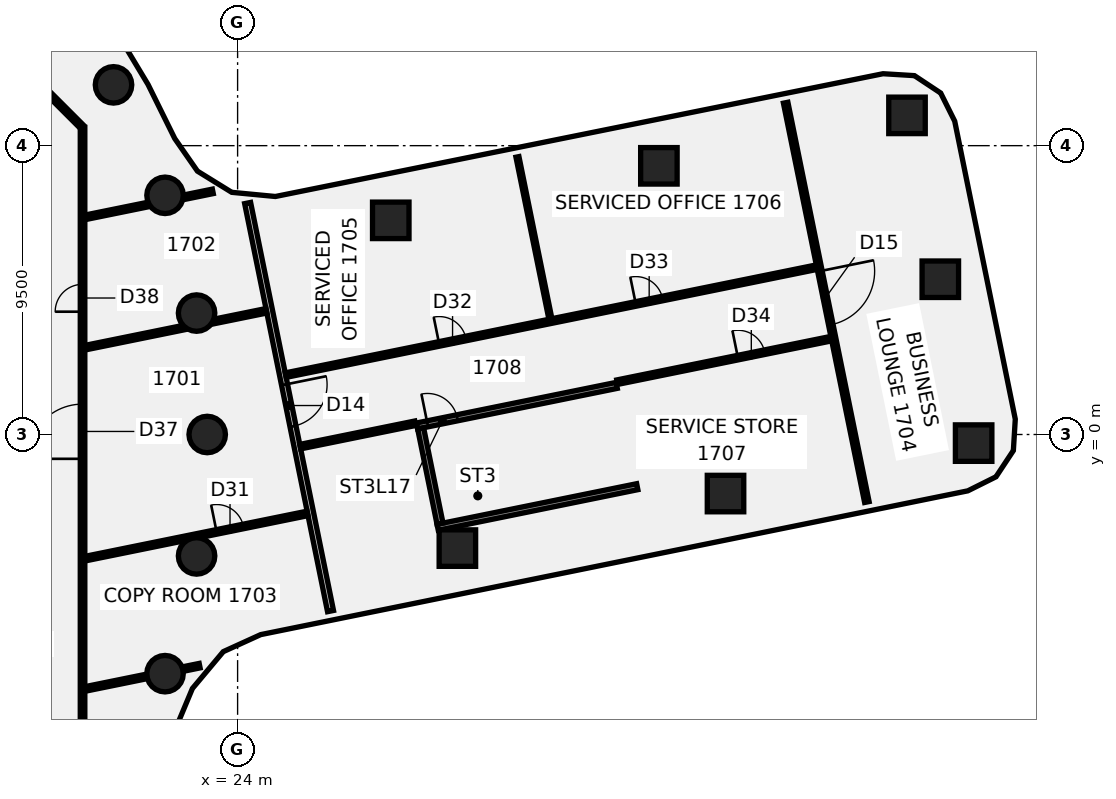
"""IFC4 building model, lengths in metres.
Left out: names, types, materials, properties, quantities, classifications, styles, units other than length and angle.
Written with IfcOpenShell. Run it as: python <this file> out.ifc"""

import sys

from ifc_helpers import new_model, si_unit, direction, frame, frame_2d, origin, origin_2d, place, context, subcontext, project, spatial, polyline, rectangle, circle, outline, extrude, element, fill, save


model = new_model("IFC4")
c1 = context("Model", 3, precision=1e-05, world=origin(), true_north=direction((0.0, 1.0)))
c2 = subcontext(c1, "Body", "Model", "MODEL_VIEW")
j1 = project(units=[si_unit("LENGTHUNIT", "METRE"), si_unit("PLANEANGLEUNIT", "RADIAN")], contexts=[c1])
p1 = place(None, origin())
s1 = spatial("IfcSite", under=j1, at=p1, CompositionType="ELEMENT")
p2 = place(p1, origin())
s2 = spatial("IfcBuilding", under=s1, at=p2, CompositionType="ELEMENT")
p3 = place(p2, frame((0.0, 0.0, 75.25)))
s3 = spatial("IfcBuildingStorey", under=s2, at=p3, CompositionType="ELEMENT", Elevation=75.25)
for number, where, z_axis, x_axis in (
    (1, (23.0, 0.0, -0.14), (0.0, 0.0, 1.0), (1.0, 0.0, 0.0)),
    (2, (22.651, 3.994, -0.14), (0.0, 0.0, 1.0), (1.0, 0.0, 0.0)),
    (3, (21.613, 7.866, -0.14), (0.0, 0.0, 1.0), (1.0, 0.0, 0.0)),
    (4, (19.919, 11.5, -0.14), (0.0, 0.0, 1.0), (1.0, 0.0, 0.0)),
    (5, (21.613, -7.866, -0.14), (0.0, 0.0, 1.0), (1.0, 0.0, 0.0)),
    (6, (22.651, -3.994, -0.14), (0.0, 0.0, 1.0), (1.0, 0.0, 0.0)),
):
    element("IfcColumn", number, at=place(p3, frame(where, z_axis=z_axis, x_axis=x_axis)), inside=s3, PredefinedType="COLUMN", context=c2, shape_type="SweptSolid", body=[
        extrude(circle(Radius=0.6, at=origin_2d()), origin(), (0.0, 0.0, 1.0), 3.71),
    ])
p4 = place(p3, frame((37.857, 8.837, -0.138), z_axis=(-0.043948835728, 0.07725535249, 0.996042223176), x_axis=(0.197093187203, -0.97674033462, 0.084454687756)))
e7 = element("IfcColumn", 7, at=p4, inside=s3, PredefinedType="COLUMN", context=c2, shape_type="SweptSolid", body=[
    extrude(rectangle(XDim=1.2, YDim=1.2, at=origin_2d()), origin(), (0.0, 0.0, 1.0), 3.716),
])
p5 = place(p3, frame((40.049, -1.943, -0.138), z_axis=(0.008673247864, 0.088440845648, 0.996043669521), x_axis=(-0.979765603585, -0.198432607845, 0.026150758614)))
e8 = element("IfcColumn", 8, at=p5, inside=s3, PredefinedType="COLUMN", context=c2, shape_type="SweptSolid", body=[
    extrude(rectangle(XDim=1.2, YDim=1.2, at=origin_2d()), origin(), (0.0, 0.0, 1.0), 3.716),
])
p6 = place(p3, frame((29.038, 7.043, -0.139), z_axis=(-0.034891014198, 0.034232693176, 0.998804655499), x_axis=(0.198537646121, -0.979256198152, 0.040498166061)))
e9 = element("IfcColumn", 9, at=p6, inside=s3, PredefinedType="COLUMN", context=c2, shape_type="SweptSolid", body=[
    extrude(rectangle(XDim=1.2, YDim=1.2, at=origin_2d()), origin(), (0.0, 0.0, 1.0), 3.708),
])
p7 = place(p3, frame((31.229, -3.736, -0.139), z_axis=(0.017907556487, 0.045427257265, 0.99880713039), x_axis=(-0.979708767156, -0.198653368973, 0.026600198356)))
e10 = element("IfcColumn", 10, at=p7, inside=s3, PredefinedType="COLUMN", context=c2, shape_type="SweptSolid", body=[
    extrude(rectangle(XDim=1.2, YDim=1.2, at=origin_2d()), origin(), (0.0, 0.0, 1.0), 3.708),
])
p8 = place(p3, frame((48.21, -0.283, -0.138), z_axis=(-0.002356773352, 0.127200295059, 0.991874251383), x_axis=(-0.979992577374, -0.197697779503, 0.023024688323)))
e11 = element("IfcColumn", 11, at=p8, inside=s3, PredefinedType="COLUMN", context=c2, shape_type="SweptSolid", body=[
    extrude(rectangle(XDim=1.2, YDim=1.2, at=origin_2d()), origin(), (0.0, 0.0, 1.0), 3.729),
])
p9 = place(p3, frame((47.114, 5.106, -0.138), z_axis=(-0.028607271039, 0.121695461927, 0.992155148447), x_axis=(0.197441138054, -0.972318457177, 0.124955251334)))
e12 = element("IfcColumn", 12, at=p9, inside=s3, PredefinedType="COLUMN", context=c2, shape_type="SweptSolid", body=[
    extrude(rectangle(XDim=1.2, YDim=1.2, at=origin_2d()), origin(), (0.0, 0.0, 1.0), 3.729),
])
p10 = place(p3, frame((46.018, 10.496, -0.138), z_axis=(-0.054848749218, 0.116046339335, 0.991728219744), x_axis=(0.1960216138, -0.972644227532, 0.124654456691)))
e13 = element("IfcColumn", 13, at=p10, inside=s3, PredefinedType="COLUMN", context=c2, shape_type="SweptSolid", body=[
    extrude(rectangle(XDim=1.2, YDim=1.2, at=origin_2d()), origin(), (0.0, 0.0, 1.0), 3.73),
])
p11 = place(p3, frame((24.33, 7.613, 0.0), z_axis=(0.0, 0.0, 1.0), x_axis=(0.199070356953, -0.97998520039, 0.0)))
e14 = element("IfcWall", 14, at=p11, inside=s3, PredefinedType="PARTITIONING", context=c2, shape_type="SweptSolid", body=[
    extrude(rectangle(XDim=13.695, YDim=0.2, at=frame_2d((6.848, 0.0))), origin(), (0.0, 0.0, 1.0), 2.87),
])
p12 = place(p11, frame((6.096, 0.0, 0.0)))
e15 = element("IfcOpeningElement", 15, at=p12, cuts=e14, PredefinedType="OPENING", context=c2, shape_type="SweptSolid", body=[
    extrude(rectangle(XDim=1.4, YDim=2.1, at=frame_2d((0.7, 1.05))), frame((0.0, 0.11, 0.0), z_axis=(0.0, -1.0, 0.0), x_axis=(1.0, 0.0, 0.0)), (0.0, 0.0, 1.0), 0.22),
])
p13 = place(p3, frame((33.205, 9.13, 0.0), z_axis=(0.0, 0.0, 1.0), x_axis=(0.199282852927, -0.979942010799, 0.0)))
e16 = element("IfcWall", 16, at=p13, inside=s3, PredefinedType="PARTITIONING", context=c2, shape_type="SweptSolid", body=[
    extrude(rectangle(XDim=5.439, YDim=0.1, at=frame_2d((2.72, 0.0))), origin(), (0.0, 0.0, 1.0), 2.97),
])
p14 = place(p3, frame((42.027, 10.912, 0.0), z_axis=(0.0, 0.0, 1.0), x_axis=(0.199292547886, -0.979940039164, 0.0)))
e17 = element("IfcWall", 17, at=p14, inside=s3, PredefinedType="PARTITIONING", context=c2, shape_type="SweptSolid", body=[
    extrude(rectangle(XDim=13.402, YDim=0.15, at=frame_2d((6.701, 0.0))), origin(), (0.0, 0.0, 1.0), 2.87),
])
p15 = place(p14, frame((5.654, 0.0, 0.0)))
e18 = element("IfcOpeningElement", 18, at=p15, cuts=e17, PredefinedType="OPENING", context=c2, shape_type="SweptSolid", body=[
    extrude(rectangle(XDim=1.8, YDim=2.1, at=frame_2d((0.9, 1.05))), frame((0.0, 0.085, 0.0), z_axis=(0.0, -1.0, 0.0), x_axis=(1.0, 0.0, 0.0)), (0.0, 0.0, 1.0), 0.17),
])
p16 = place(p3, frame((17.128, 11.872, 0.0), z_axis=(0.0, 0.0, 1.0), x_axis=(0.707106781187, -0.707106781187, 0.0)))
e19 = element("IfcWall", 19, at=p16, inside=s3, PredefinedType="PARTITIONING", context=c2, shape_type="SweptSolid", body=[
    extrude(rectangle(XDim=2.465, YDim=0.15, at=frame_2d((1.232, 0.0))), origin(), (0.0, 0.0, 1.0), 2.97),
])
p17 = place(p3, frame((18.973, -4.085, 0.0), z_axis=(0.0, 0.0, 1.0), x_axis=(0.979950067583, 0.19924323086, 0.0)))
e20 = element("IfcWall", 20, at=p17, inside=s3, PredefinedType="PARTITIONING", context=c2, shape_type="SweptSolid", body=[
    extrude(rectangle(XDim=7.475, YDim=0.15, at=frame_2d((3.737, 0.0))), origin(), (0.0, 0.0, 1.0), 2.87),
])
p18 = place(p17, frame((4.425, 0.0, 0.0)))
e21 = element("IfcOpeningElement", 21, at=p18, cuts=e20, PredefinedType="OPENING", context=c2, shape_type="SweptSolid", body=[
    extrude(rectangle(XDim=0.9, YDim=2.1, at=frame_2d((0.45, 1.05))), frame((0.0, 0.085, 0.0), z_axis=(0.0, -1.0, 0.0), x_axis=(1.0, 0.0, 0.0)), (0.0, 0.0, 1.0), 0.17),
])
p19 = place(p3, frame((18.973, 2.854, 0.0), z_axis=(0.0, 0.0, 1.0), x_axis=(0.979950296152, 0.199242106673, 0.0)))
e22 = element("IfcWall", 22, at=p19, inside=s3, PredefinedType="PARTITIONING", context=c2, shape_type="SweptSolid", body=[
    extrude(rectangle(XDim=3.378, YDim=0.15, at=frame_2d((1.689, 0.0))), origin(), (0.0, 0.0, 1.0), 2.97),
])
p20 = place(p3, frame((23.185, 3.71, 0.0), z_axis=(0.0, 0.0, 1.0), x_axis=(0.979938907772, 0.199298110967, 0.0)))
e23 = element("IfcWall", 23, at=p20, inside=s3, PredefinedType="PARTITIONING", context=c2, shape_type="SweptSolid", body=[
    extrude(rectangle(XDim=1.8, YDim=0.15, at=frame_2d((0.9, 0.0))), origin(), (0.0, 0.0, 1.0), 2.87),
])
p21 = place(p3, frame((18.973, -8.371, 0.0), z_axis=(0.0, 0.0, 1.0), x_axis=(0.979966356474, 0.199163099443, 0.0)))
e24 = element("IfcWall", 24, at=p21, inside=s3, PredefinedType="PARTITIONING", context=c2, shape_type="SweptSolid", body=[
    extrude(rectangle(XDim=2.095, YDim=0.15, at=frame_2d((1.047, 0.0))), origin(), (0.0, 0.0, 1.0), 2.97),
])
p22 = place(p3, frame((22.183, -7.719, 0.0), z_axis=(0.0, 0.0, 1.0), x_axis=(0.980025828953, 0.1988702456, 0.0)))
e25 = element("IfcWall", 25, at=p22, inside=s3, PredefinedType="PARTITIONING", context=c2, shape_type="SweptSolid", body=[
    extrude(rectangle(XDim=0.579, YDim=0.15, at=frame_2d((0.29, 0.0))), origin(), (0.0, 0.0, 1.0), 2.97),
])
p23 = place(p3, frame((25.583, 1.953, 0.0), z_axis=(0.0, 0.0, 1.0), x_axis=(0.979952528363, 0.199231127477, 0.0)))
e26 = element("IfcWall", 26, at=p23, inside=s3, PredefinedType="PARTITIONING", context=c2, shape_type="SweptSolid", body=[
    extrude(rectangle(XDim=17.825, YDim=0.15, at=frame_2d((8.913, 0.0))), origin(), (0.0, 0.0, 1.0), 2.87),
])
p24 = place(p23, frame((5.15, 0.0, 0.0)))
e27 = element("IfcOpeningElement", 27, at=p24, cuts=e26, PredefinedType="OPENING", context=c2, shape_type="SweptSolid", body=[
    extrude(rectangle(XDim=0.9, YDim=2.1, at=frame_2d((0.45, 1.05))), frame((0.0, 0.085, 0.0), z_axis=(0.0, -1.0, 0.0), x_axis=(1.0, 0.0, 0.0)), (0.0, 0.0, 1.0), 0.17),
])
p25 = place(p23, frame((11.75, 0.0, 0.0)))
e28 = element("IfcOpeningElement", 28, at=p25, cuts=e26, PredefinedType="OPENING", context=c2, shape_type="SweptSolid", body=[
    extrude(rectangle(XDim=0.9, YDim=2.1, at=frame_2d((0.45, 1.05))), frame((0.0, 0.085, 0.0), z_axis=(0.0, -1.0, 0.0), x_axis=(1.0, 0.0, 0.0)), (0.0, 0.0, 1.0), 0.17),
])
p26 = place(p3, frame((26.061, -0.399, 0.0), z_axis=(0.0, 0.0, 1.0), x_axis=(0.979938127912, 0.199301945462, 0.0)))
e29 = element("IfcWall", 29, at=p26, inside=s3, PredefinedType="PARTITIONING", context=c2, shape_type="SweptSolid", body=[
    extrude(rectangle(XDim=3.86, YDim=0.15, at=frame_2d((1.93, 0.0))), origin(), (0.0, 0.0, 1.0), 2.87),
])
p27 = place(p3, frame((36.487, 1.721, 0.0), z_axis=(0.0, 0.0, 1.0), x_axis=(0.979936437321, 0.199310257665, 0.0)))
e30 = element("IfcWall", 30, at=p27, inside=s3, PredefinedType="PARTITIONING", context=c2, shape_type="SweptSolid", body=[
    extrude(rectangle(XDim=7.186, YDim=0.15, at=frame_2d((3.593, 0.0))), origin(), (0.0, 0.0, 1.0), 2.87),
])
p28 = place(p27, frame((4.05, 0.0, 0.0)))
e31 = element("IfcOpeningElement", 31, at=p28, cuts=e30, PredefinedType="OPENING", context=c2, shape_type="SweptSolid", body=[
    extrude(rectangle(XDim=0.9, YDim=2.1, at=frame_2d((0.45, 1.05))), frame((0.0, 0.085, 0.0), z_axis=(0.0, -1.0, 0.0), x_axis=(1.0, 0.0, 0.0)), (0.0, 0.0, 1.0), 0.17),
])
p29 = place(p3, frame((18.973, 7.14, 0.0), z_axis=(0.0, 0.0, 1.0), x_axis=(0.979916380724, 0.199408843305, 0.0)))
e32 = element("IfcWall", 32, at=p29, inside=s3, PredefinedType="PARTITIONING", context=c2, shape_type="SweptSolid", body=[
    extrude(rectangle(XDim=2.152, YDim=0.15, at=frame_2d((1.076, 0.0))), origin(), (0.0, 0.0, 1.0), 2.97),
])
p30 = place(p3, frame((22.204, 7.797, 0.0), z_axis=(0.0, 0.0, 1.0), x_axis=(0.979965738982, 0.199166137736, 0.0)))
e33 = element("IfcWall", 33, at=p30, inside=s3, PredefinedType="PARTITIONING", context=c2, shape_type="SweptSolid", body=[
    extrude(rectangle(XDim=1.0, YDim=0.15, at=frame_2d((0.5, 0.0))), origin(), (0.0, 0.0, 1.0), 2.97),
])
p31 = place(p3, frame((18.9, -10.1, 0.0), z_axis=(0.0, 0.0, 1.0), x_axis=(0.0, 1.0, 0.0)))
e34 = element("IfcWall", 34, at=p31, inside=s3, PredefinedType="PARTITIONING", context=c2, shape_type="SweptSolid", body=[
    extrude(rectangle(XDim=20.2, YDim=0.15, at=frame_2d((10.1, 0.0))), origin(), (0.0, 0.0, 1.0), 2.97),
])
p32 = place(p31, frame((9.3, 0.0, 0.0)))
e35 = element("IfcOpeningElement", 35, at=p32, cuts=e34, PredefinedType="OPENING", context=c2, shape_type="SweptSolid", body=[
    extrude(rectangle(XDim=1.8, YDim=2.1, at=frame_2d((0.9, 1.05))), frame((0.0, 0.085, 0.0), z_axis=(0.0, -1.0, 0.0), x_axis=(1.0, 0.0, 0.0)), (0.0, 0.0, 1.0), 0.17),
])
p33 = place(p31, frame((14.139, 0.0, 0.0)))
e36 = element("IfcOpeningElement", 36, at=p33, cuts=e34, PredefinedType="OPENING", context=c2, shape_type="SweptSolid", body=[
    extrude(rectangle(XDim=0.9, YDim=2.1, at=frame_2d((0.45, 1.05))), frame((0.0, 0.085, 0.0), z_axis=(0.0, -1.0, 0.0), x_axis=(1.0, 0.0, 0.0)), (0.0, 0.0, 1.0), 0.17),
])
p34 = place(p3, frame((29.903, 0.28, -0.14), z_axis=(0.0, 0.0, 1.0), x_axis=(0.979956319534, 0.199212479042, 0.0)))
e37 = element("IfcWall", 37, at=p34, inside=s3, PredefinedType="SHEAR", context=c2, shape_type="SweptSolid", body=[
    extrude(rectangle(XDim=6.7, YDim=0.2, at=frame_2d((3.35, 0.0))), origin(), (0.0, 0.0, 1.0), 3.01),
])
p35 = place(p34, frame((0.35, 0.0, 0.0)))
e38 = element("IfcOpeningElement", 38, at=p35, cuts=e37, PredefinedType="OPENING", context=c2, shape_type="SweptSolid", body=[
    extrude(rectangle(XDim=1.0, YDim=2.1, at=frame_2d((0.5, 1.05))), frame((0.0, 0.11, 0.0), z_axis=(0.0, -1.0, 0.0), x_axis=(1.0, 0.0, 0.0)), (0.0, 0.0, 1.0), 0.22),
])
p36 = place(p3, frame((30.58, -3.052, -0.14), z_axis=(0.0, 0.0, 1.0), x_axis=(0.979949205339, 0.199247471639, 0.0)))
e39 = element("IfcWall", 39, at=p36, inside=s3, PredefinedType="SHEAR", context=c2, shape_type="SweptSolid", body=[
    extrude(rectangle(XDim=6.7, YDim=0.2, at=frame_2d((3.35, 0.0))), origin(), (0.0, 0.0, 1.0), 3.01),
])
p37 = place(p3, frame((30.658, -2.934, -0.14), z_axis=(0.0, 0.0, 1.0), x_axis=(-0.199284316026, 0.97994171326, 0.0)))
e40 = element("IfcWall", 40, at=p37, inside=s3, PredefinedType="SHEAR", context=c2, shape_type="SweptSolid", body=[
    extrude(rectangle(XDim=3.2, YDim=0.2, at=frame_2d((1.6, 0.0))), origin(), (0.0, 0.0, 1.0), 3.01),
])
p38 = place(p3, frame((0.0, 0.0, -0.14)))
e41 = element("IfcWall", 41, at=p38, inside=s3, PredefinedType="SHEAR", context=c2, shape_type="SweptSolid", body=[
    extrude(outline(polyline([(36.93, -1.659), (37.126, -1.619), (36.488, 1.517), (36.292, 1.477), (36.93, -1.659)])), origin(), (0.0, 0.0, 1.0), 3.01),
])
p39 = place(p12, frame((1.4, 0.0, 0.0), z_axis=(0.0, 0.0, 1.0), x_axis=(-1.0, 0.0, 0.0)))
e42 = element("IfcDoor", 42, at=p39, inside=s3, OperationType="DOUBLE_DOOR_SINGLE_SWING", PredefinedType="DOOR", context=c2, shape_type="SweptSolid", body=[
    extrude(rectangle(XDim=1.4, YDim=2.1, at=frame_2d((0.7, 1.05))), frame((0.0, 0.025, 0.0), z_axis=(0.0, -1.0, 0.0), x_axis=(1.0, 0.0, 0.0)), (0.0, 0.0, 1.0), 0.05),
])
fill(e15, e42)
p40 = place(p15, origin())
e43 = element("IfcDoor", 43, at=p40, inside=s3, OperationType="DOUBLE_DOOR_SINGLE_SWING", PredefinedType="DOOR", context=c2, shape_type="SweptSolid", body=[
    extrude(rectangle(XDim=1.8, YDim=2.1, at=frame_2d((0.9, 1.05))), frame((0.0, 0.025, 0.0), z_axis=(0.0, -1.0, 0.0), x_axis=(1.0, 0.0, 0.0)), (0.0, 0.0, 1.0), 0.05),
])
fill(e18, e43)
p41 = place(p18, frame((0.9, 0.0, 0.0), z_axis=(0.0, 0.0, 1.0), x_axis=(-1.0, 0.0, 0.0)))
e44 = element("IfcDoor", 44, at=p41, inside=s3, OperationType="SINGLE_SWING_RIGHT", PredefinedType="DOOR", context=c2, shape_type="SweptSolid", body=[
    extrude(rectangle(XDim=0.9, YDim=2.1, at=frame_2d((0.45, 1.05))), frame((0.0, 0.025, 0.0), z_axis=(0.0, -1.0, 0.0), x_axis=(1.0, 0.0, 0.0)), (0.0, 0.0, 1.0), 0.05),
])
fill(e21, e44)
p42 = place(p24, origin())
e45 = element("IfcDoor", 45, at=p42, inside=s3, OperationType="SINGLE_SWING_RIGHT", PredefinedType="DOOR", context=c2, shape_type="SweptSolid", body=[
    extrude(rectangle(XDim=0.9, YDim=2.1, at=frame_2d((0.45, 1.05))), frame((0.0, 0.025, 0.0), z_axis=(0.0, -1.0, 0.0), x_axis=(1.0, 0.0, 0.0)), (0.0, 0.0, 1.0), 0.05),
])
fill(e27, e45)
p43 = place(p25, origin())
e46 = element("IfcDoor", 46, at=p43, inside=s3, OperationType="SINGLE_SWING_LEFT", PredefinedType="DOOR", context=c2, shape_type="SweptSolid", body=[
    extrude(rectangle(XDim=0.9, YDim=2.1, at=frame_2d((0.45, 1.05))), frame((0.0, 0.025, 0.0), z_axis=(0.0, -1.0, 0.0), x_axis=(1.0, 0.0, 0.0)), (0.0, 0.0, 1.0), 0.05),
])
fill(e28, e46)
p44 = place(p28, frame((0.9, 0.0, 0.0), z_axis=(0.0, 0.0, 1.0), x_axis=(-1.0, 0.0, 0.0)))
e47 = element("IfcDoor", 47, at=p44, inside=s3, OperationType="SINGLE_SWING_RIGHT", PredefinedType="DOOR", context=c2, shape_type="SweptSolid", body=[
    extrude(rectangle(XDim=0.9, YDim=2.1, at=frame_2d((0.45, 1.05))), frame((0.0, 0.025, 0.0), z_axis=(0.0, -1.0, 0.0), x_axis=(1.0, 0.0, 0.0)), (0.0, 0.0, 1.0), 0.05),
])
fill(e31, e47)
p45 = place(p32, origin())
e48 = element("IfcDoor", 48, at=p45, inside=s3, OperationType="DOUBLE_DOOR_SINGLE_SWING", PredefinedType="DOOR", context=c2, shape_type="SweptSolid", body=[
    extrude(rectangle(XDim=1.8, YDim=2.1, at=frame_2d((0.9, 1.05))), frame((0.0, 0.025, 0.0), z_axis=(0.0, -1.0, 0.0), x_axis=(1.0, 0.0, 0.0)), (0.0, 0.0, 1.0), 0.05),
])
fill(e35, e48)
p46 = place(p33, frame((0.9, 0.0, 0.0), z_axis=(0.0, 0.0, 1.0), x_axis=(-1.0, 0.0, 0.0)))
e49 = element("IfcDoor", 49, at=p46, inside=s3, OperationType="SINGLE_SWING_RIGHT", PredefinedType="DOOR", context=c2, shape_type="SweptSolid", body=[
    extrude(rectangle(XDim=0.9, YDim=2.1, at=frame_2d((0.45, 1.05))), frame((0.0, 0.025, 0.0), z_axis=(0.0, -1.0, 0.0), x_axis=(1.0, 0.0, 0.0)), (0.0, 0.0, 1.0), 0.05),
])
fill(e36, e49)
p47 = place(p35, origin())
e50 = element("IfcDoor", 50, at=p47, inside=s3, OperationType="SINGLE_SWING_LEFT", PredefinedType="DOOR", context=c2, shape_type="SweptSolid", body=[
    extrude(rectangle(XDim=1.0, YDim=2.1, at=frame_2d((0.5, 1.05))), frame((0.0, 0.025, 0.0), z_axis=(0.0, -1.0, 0.0), x_axis=(1.0, 0.0, 0.0)), (0.0, 0.0, 1.0), 0.05),
])
fill(e38, e50)
save(model, sys.argv[1])
